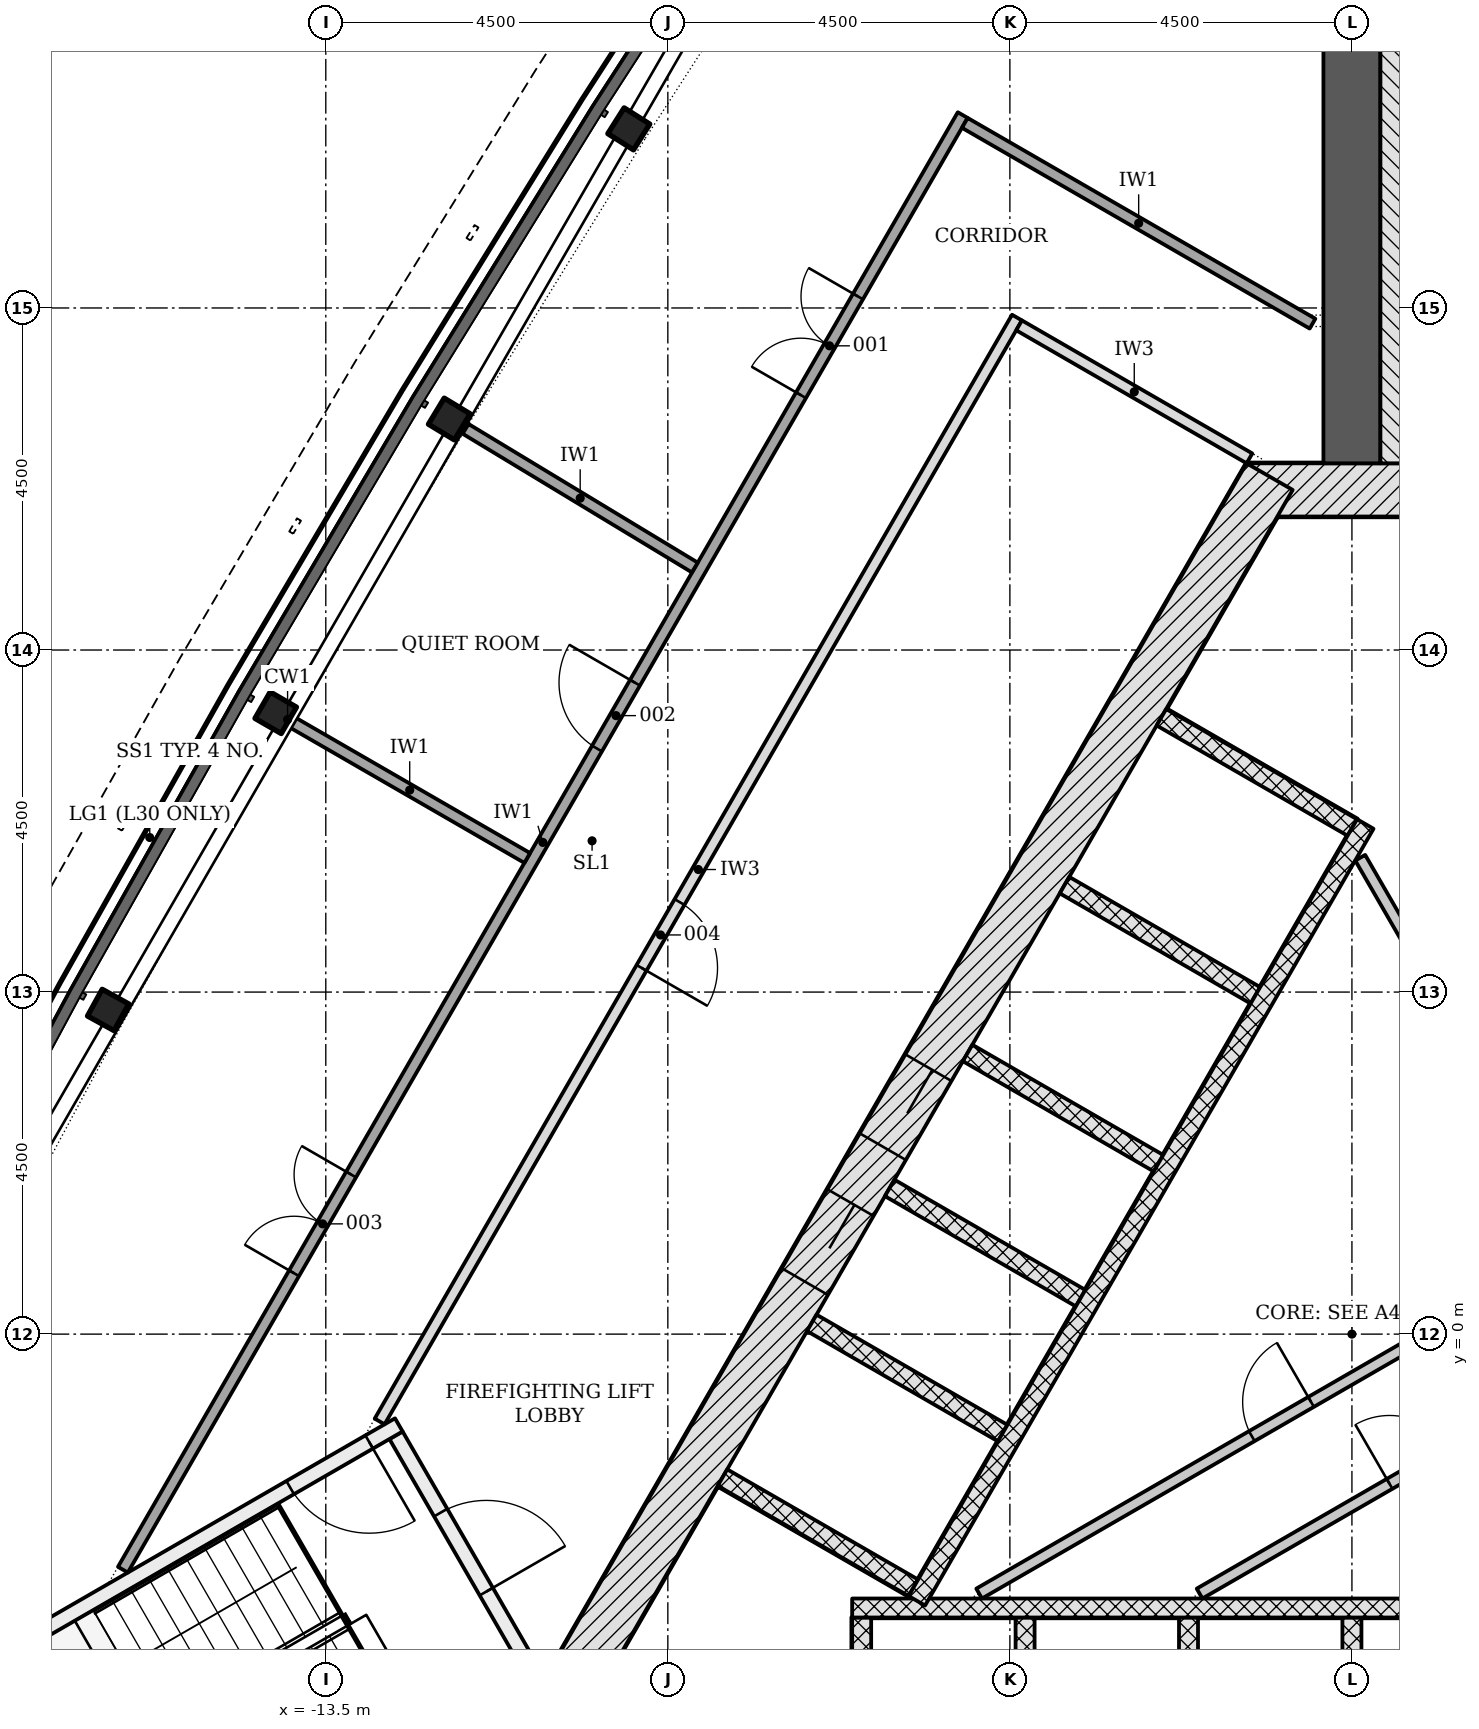
"""IFC4 building model, lengths in metres.
Left out: names, types, materials, properties, quantities, classifications, styles, units other than length and angle.
Written with IfcOpenShell. Run it as: python <this file> out.ifc"""

import sys

from ifc_helpers import new_model, si_unit, direction, frame, frame_2d, origin, origin_2d, place, context, subcontext, project, spatial, polyline, rectangle, i_section, outline, extrude, element, fill, save


model = new_model("IFC4")
c1 = context("Model", 3, precision=1e-05, world=origin(), true_north=direction((0.0, 1.0)))
c2 = subcontext(c1, "Body", "Model", "MODEL_VIEW")
j1 = project(units=[si_unit("LENGTHUNIT", "METRE"), si_unit("PLANEANGLEUNIT", "RADIAN")], contexts=[c1])
p1 = place(None, origin())
s1 = spatial("IfcSite", under=j1, at=p1, CompositionType="ELEMENT")
p2 = place(p1, origin())
s2 = spatial("IfcBuilding", under=s1, at=p2, CompositionType="ELEMENT")
p3 = place(p2, frame((0.0, 0.0, 116.7)))
s3 = spatial("IfcBuildingStorey", under=s2, at=p3, CompositionType="ELEMENT", Elevation=116.7)
p4 = place(p3, frame((1.386, 11.106, -0.2), z_axis=(0.0, 0.0, 1.0), x_axis=(-1.0, 0.0, 0.0)))
e1 = element("IfcWall", 1, at=p4, inside=s3, PredefinedType="SHEAR", context=c2, shape_type="SweptSolid", body=[
    extrude(rectangle(XDim=2.771, YDim=0.7, at=frame_2d((1.386, 0.0))), origin(), (0.0, 0.0, 1.0), 3.6),
])
p5 = place(p3, frame((-1.083, 11.281, -0.2), z_axis=(0.0, 0.0, 1.0), x_axis=(-0.500001446645, -0.866024568562, 0.0)))
e2 = element("IfcWall", 2, at=p5, inside=s3, PredefinedType="SHEAR", context=c2, shape_type="SweptSolid", body=[
    extrude(rectangle(XDim=18.458, YDim=0.7, at=frame_2d((9.229, 0.0))), origin(), (0.0, 0.0, 1.0), 3.6),
])
p6 = place(p5, frame((8.979, 0.0, 0.2)))
e3 = element("IfcOpeningElement", 3, at=p6, cuts=e2, PredefinedType="OPENING", context=c2, shape_type="SweptSolid", body=[
    extrude(rectangle(XDim=1.2, YDim=2.1, at=frame_2d((0.6, 1.05))), frame((0.0, 0.36, 0.0), z_axis=(0.0, -1.0, 0.0), x_axis=(1.0, 0.0, 0.0)), (0.0, 0.0, 1.0), 0.72),
])
p7 = place(p5, frame((11.029, 0.0, 0.2)))
e4 = element("IfcOpeningElement", 4, at=p7, cuts=e2, PredefinedType="OPENING", context=c2, shape_type="SweptSolid", body=[
    extrude(rectangle(XDim=1.2, YDim=2.1, at=frame_2d((0.6, 1.05))), frame((0.0, 0.36, 0.0), z_axis=(0.0, -1.0, 0.0), x_axis=(1.0, 0.0, 0.0)), (0.0, 0.0, 1.0), 0.72),
])
p8 = place(p3, frame((0.0, 11.456, -0.2), z_axis=(0.0, 0.0, 1.0), x_axis=(0.0, 1.0, 0.0)))
e5 = element("IfcWall", 5, at=p8, inside=s3, PredefinedType="SHEAR", context=c2, shape_type="SweptSolid", body=[
    extrude(rectangle(XDim=11.539, YDim=0.75, at=frame_2d((5.77, 0.0))), origin(), (0.0, 0.0, 1.0), 3.6),
])
for number, where, z_axis, x_axis in (
    (6, (-9.513, 15.856, -0.2), (0.0, 0.0, 1.0), (-0.535, -0.845, 0.0)),
    (7, (-11.875, 12.039, -0.2), (0.0, 0.0, 1.0), (-0.517, -0.856, 0.0)),
    (8, (-14.159, 8.175, -0.2), (0.0, 0.0, 1.0), (-0.5, -0.866, 0.0)),
    (9, (-16.364, 4.265, -0.2), (0.0, 0.0, 1.0), (-0.482, -0.876, 0.0)),
):
    element("IfcColumn", number, at=place(p3, frame(where, z_axis=z_axis, x_axis=x_axis)), inside=s3, PredefinedType="COLUMN", context=c2, shape_type="SweptSolid", body=[
        extrude(i_section(OverallWidth=0.401, OverallDepth=0.399, WebThickness=0.025, FlangeThickness=0.04, FilletRadius=0.015, at=origin_2d()), origin(), (0.0, 0.0, 1.0), 3.6),
    ])
for number, where, z_axis, x_axis in (
    (10, (-6.45, -6.228, -0.2), (0.0, 0.0, 1.0), (0.0, 1.0, 0.0)),
    (11, (-4.3, -6.228, -0.2), (0.0, 0.0, 1.0), (0.0, 1.0, 0.0)),
    (12, (-2.15, -6.228, -0.2), (0.0, 0.0, 1.0), (0.0, 1.0, 0.0)),
    (13, (0.0, -6.228, -0.2), (0.0, 0.0, 1.0), (0.0, 1.0, 0.0)),
):
    element("IfcWall", number, at=place(p3, frame(where, z_axis=z_axis, x_axis=x_axis)), inside=s3, PredefinedType="PARTITIONING", context=c2, shape_type="SweptSolid", body=[
        extrude(rectangle(XDim=2.5, YDim=0.25, at=frame_2d((1.25, 0.0))), origin(), (0.0, 0.0, 1.0), 3.6),
    ])
p9 = place(p3, frame((-6.575, -3.603, 0.0), z_axis=(0.0, 0.0, 1.0), x_axis=(1.0, 0.0, 0.0)))
e14 = element("IfcWall", 14, at=p9, inside=s3, PredefinedType="PARTITIONING", context=c2, shape_type="SweptSolid", body=[
    extrude(rectangle(XDim=13.15, YDim=0.25, at=frame_2d((6.575, 0.0))), origin(), (0.0, 0.0, 1.0), 3.4),
])
p10 = place(p3, frame((-2.506, 8.115, -0.2), z_axis=(0.0, 0.0, 1.0), x_axis=(0.865996321171, -0.50005036918, 0.0)))
e15 = element("IfcWall", 15, at=p10, inside=s3, PredefinedType="PARTITIONING", context=c2, shape_type="SweptSolid", body=[
    extrude(rectangle(XDim=2.9, YDim=0.25, at=frame_2d((1.45, 0.0))), origin(), (0.0, 0.0, 1.0), 3.6),
])
for number, where, z_axis, x_axis in (
    (16, (-3.781, 5.907, -0.2), (0.0, 0.0, 1.0), (0.866, -0.5, 0.0)),
    (17, (-5.056, 3.699, -0.2), (0.0, 0.0, 1.0), (0.866, -0.5, 0.0)),
    (18, (-6.081, 1.923, -0.2), (0.0, 0.0, 1.0), (0.866, -0.5, 0.0)),
    (19, (-7.106, 0.148, -0.2), (0.0, 0.0, 1.0), (0.866, -0.5, 0.0)),
    (20, (-8.281, -1.887, -0.2), (0.0, 0.0, 1.0), (0.866, -0.5, 0.0)),
):
    element("IfcWall", number, at=place(p3, frame(where, z_axis=z_axis, x_axis=x_axis)), inside=s3, PredefinedType="PARTITIONING", context=c2, shape_type="SweptSolid", body=[
        extrude(rectangle(XDim=2.9, YDim=0.25, at=frame_2d((1.45, 0.0))), origin(), (0.0, 0.0, 1.0), 3.6),
    ])
p11 = place(p3, frame((0.176, 6.711, 0.0), z_axis=(0.0, 0.0, 1.0), x_axis=(-0.500004227369, -0.866022963098, 0.0)))
e21 = element("IfcWall", 21, at=p11, inside=s3, PredefinedType="PARTITIONING", context=c2, shape_type="SweptSolid", body=[
    extrude(rectangle(XDim=11.8, YDim=0.25, at=frame_2d((5.9, 0.0))), origin(), (0.0, 0.0, 1.0), 3.4),
])
p12 = place(p3, frame((-4.904, -3.413, 0.0), z_axis=(0.0, 0.0, 1.0), x_axis=(0.866020716117, 0.500008119189, 0.0)))
e22 = element("IfcWall", 22, at=p12, inside=s3, PredefinedType="PARTITIONING", context=c2, shape_type="SweptSolid", body=[
    extrude(rectangle(XDim=12.182, YDim=0.15, at=frame_2d((6.091, 0.0))), origin(), (0.0, 0.0, 1.0), 3.4),
])
p13 = place(p12, frame((4.142, 0.0, 0.0)))
e23 = element("IfcOpeningElement", 23, at=p13, cuts=e22, PredefinedType="OPENING", context=c2, shape_type="SweptSolid", body=[
    extrude(rectangle(XDim=0.9, YDim=2.1, at=frame_2d((0.45, 1.05))), frame((0.0, 0.085, 0.0), z_axis=(0.0, -1.0, 0.0), x_axis=(1.0, 0.0, 0.0)), (0.0, 0.0, 1.0), 0.17),
])
p14 = place(p3, frame((-2.004, -3.413, 0.0), z_axis=(0.0, 0.0, 1.0), x_axis=(0.866030034802, 0.499991978756, 0.0)))
e24 = element("IfcWall", 24, at=p14, inside=s3, PredefinedType="PARTITIONING", context=c2, shape_type="SweptSolid", body=[
    extrude(rectangle(XDim=9.671, YDim=0.15, at=frame_2d((4.835, 0.0))), origin(), (0.0, 0.0, 1.0), 3.4),
])
p15 = place(p14, frame((2.886, 0.0, 0.0)))
e25 = element("IfcOpeningElement", 25, at=p15, cuts=e24, PredefinedType="OPENING", context=c2, shape_type="SweptSolid", body=[
    extrude(rectangle(XDim=0.9, YDim=2.1, at=frame_2d((0.45, 1.05))), frame((0.0, 0.085, 0.0), z_axis=(0.0, -1.0, 0.0), x_axis=(1.0, 0.0, 0.0)), (0.0, 0.0, 1.0), 0.17),
])
p16 = place(p3, frame((2.86, 1.503, 0.0), z_axis=(0.0, 0.0, 1.0), x_axis=(-0.500014382217, 0.866017100048, 0.0)))
e26 = element("IfcWall", 26, at=p16, inside=s3, PredefinedType="PARTITIONING", context=c2, shape_type="SweptSolid", body=[
    extrude(rectangle(XDim=5.502, YDim=0.15, at=frame_2d((2.751, 0.0))), origin(), (0.0, 0.0, 1.0), 3.4),
])
p17 = place(p3, frame((0.98, 11.456, -0.2), z_axis=(0.0, 0.0, 1.0), x_axis=(0.0, 1.0, 0.0)))
e27 = element("IfcWall", 27, at=p17, inside=s3, PredefinedType="SHEAR", context=c2, shape_type="SweptSolid", body=[
    extrude(rectangle(XDim=7.2, YDim=1.211, at=frame_2d((3.6, 0.0))), origin(), (0.0, 0.0, 1.0), 3.6),
])
p18 = place(p3, frame((-12.576, -1.331, -0.2), z_axis=(0.0, 0.0, 1.0), x_axis=(0.499970499736, -0.8660424351, 0.0)))
e28 = element("IfcWall", 28, at=p18, inside=s3, PredefinedType="SHEAR", context=c2, shape_type="SweptSolid", body=[
    extrude(rectangle(XDim=3.55, YDim=0.2, at=frame_2d((1.775, 0.0))), origin(), (0.0, 0.0, 1.0), 3.6),
])
p19 = place(p18, frame((1.175, 0.0, 0.2)))
e29 = element("IfcOpeningElement", 29, at=p19, cuts=e28, PredefinedType="OPENING", context=c2, shape_type="SweptSolid", body=[
    extrude(rectangle(XDim=1.2, YDim=2.1, at=frame_2d((0.6, 1.05))), frame((0.0, 0.11, 0.0), z_axis=(0.0, -1.0, 0.0), x_axis=(1.0, 0.0, 0.0)), (0.0, 0.0, 1.0), 0.22),
])
p20 = place(p3, frame((-12.539, -1.194, -0.2), z_axis=(0.0, 0.0, 1.0), x_axis=(-0.866045472092, -0.499965239061, 0.0)))
e30 = element("IfcWall", 30, at=p20, inside=s3, PredefinedType="SHEAR", context=c2, shape_type="SweptSolid", body=[
    extrude(rectangle(XDim=5.6, YDim=0.2, at=frame_2d((2.8, 0.0))), origin(), (0.0, 0.0, 1.0), 3.6),
])
p21 = place(p20, frame((0.45, 0.0, 0.2)))
e31 = element("IfcOpeningElement", 31, at=p21, cuts=e30, PredefinedType="OPENING", context=c2, shape_type="SweptSolid", body=[
    extrude(rectangle(XDim=1.2, YDim=2.1, at=frame_2d((0.6, 1.05))), frame((0.0, 0.11, 0.0), z_axis=(0.0, -1.0, 0.0), x_axis=(1.0, 0.0, 0.0)), (0.0, 0.0, 1.0), 0.22),
])
p22 = place(p3, frame((0.0, 0.0, -0.2)))
e32 = element("IfcWall", 32, at=p22, inside=s3, PredefinedType="SHEAR", context=c2, shape_type="SweptSolid", body=[
    extrude(outline(polyline([(-17.439, -3.907), (-18.025, -6.093), (-16.95, -7.955), (-16.777, -7.855), (-17.81, -6.065), (-17.267, -4.039), (-17.339, -4.081), (-17.339, -4.081), (-17.339, -4.081), (-17.339, -4.081), (-17.339, -4.081), (-17.339, -4.081), (-17.339, -4.081), (-17.339, -4.081), (-17.339, -4.081), (-17.339, -4.081), (-17.339, -4.081), (-17.339, -4.081), (-17.339, -4.081), (-17.339, -4.081), (-17.339, -4.081), (-17.339, -4.081), (-17.339, -4.081), (-17.439, -3.907)])), origin(), (0.0, 0.0, 1.0), 3.6),
])
p23 = place(p3, frame((-16.169, -3.099, 0.0), z_axis=(0.0, 0.0, 1.0), x_axis=(0.499999805269, 0.866025516212, 0.0)))
e33 = element("IfcWall", 33, at=p23, inside=s3, PredefinedType="PARTITIONING", context=c2, shape_type="SweptSolid", body=[
    extrude(rectangle(XDim=22.097, YDim=0.15, at=frame_2d((11.049, 0.0))), origin(), (0.0, 0.0, 1.0), 2.847),
])
p24 = place(p23, frame((17.842, 0.0, 0.0)))
e34 = element("IfcOpeningElement", 34, at=p24, cuts=e33, PredefinedType="OPENING", context=c2, shape_type="SweptSolid", body=[
    extrude(rectangle(XDim=1.5, YDim=2.1, at=frame_2d((0.75, 1.05))), frame((0.0, 0.085, 0.0), z_axis=(0.0, -1.0, 0.0), x_axis=(1.0, 0.0, 0.0)), (0.0, 0.0, 1.0), 0.17),
])
p25 = place(p23, frame((12.474, 0.0, 0.0)))
e35 = element("IfcOpeningElement", 35, at=p25, cuts=e33, PredefinedType="OPENING", context=c2, shape_type="SweptSolid", body=[
    extrude(rectangle(XDim=1.0, YDim=2.1, at=frame_2d((0.5, 1.05))), frame((0.0, 0.085, 0.0), z_axis=(0.0, -1.0, 0.0), x_axis=(1.0, 0.0, 0.0)), (0.0, 0.0, 1.0), 0.17),
])
p26 = place(p23, frame((4.503, 0.0, 0.0)))
e36 = element("IfcOpeningElement", 36, at=p26, cuts=e33, PredefinedType="OPENING", context=c2, shape_type="SweptSolid", body=[
    extrude(rectangle(XDim=1.5, YDim=2.1, at=frame_2d((0.75, 1.05))), frame((0.0, 0.085, 0.0), z_axis=(0.0, -1.0, 0.0), x_axis=(1.0, 0.0, 0.0)), (0.0, 0.0, 1.0), 0.17),
])
p27 = place(p3, frame((-4.407, 13.374, 0.0), z_axis=(0.0, 0.0, 1.0), x_axis=(-0.499997181693, -0.866027030928, 0.0)))
e37 = element("IfcWall", 37, at=p27, inside=s3, PredefinedType="PARTITIONING", context=c2, shape_type="SweptSolid", body=[
    extrude(rectangle(XDim=16.77, YDim=0.15, at=frame_2d((8.385, 0.0))), origin(), (0.0, 0.0, 1.0), 2.847),
])
p28 = place(p27, frame((8.879, 0.0, 0.0)))
e38 = element("IfcOpeningElement", 38, at=p28, cuts=e37, PredefinedType="OPENING", context=c2, shape_type="SweptSolid", body=[
    extrude(rectangle(XDim=1.0, YDim=2.1, at=frame_2d((0.5, 1.05))), frame((0.0, 0.085, 0.0), z_axis=(0.0, -1.0, 0.0), x_axis=(1.0, 0.0, 0.0)), (0.0, 0.0, 1.0), 0.17),
])
p29 = place(p3, frame((-5.093, 15.935, 0.0), z_axis=(0.0, 0.0, 1.0), x_axis=(0.866033195618, -0.499986503906, 0.0)))
e39 = element("IfcWall", 39, at=p29, inside=s3, PredefinedType="PARTITIONING", context=c2, shape_type="SweptSolid", body=[
    extrude(rectangle(XDim=5.282, YDim=0.15, at=frame_2d((2.641, 0.0))), origin(), (0.0, 0.0, 1.0), 3.4),
])
p30 = place(p3, frame((-4.379, 13.271, 0.0), z_axis=(0.0, 0.0, 1.0), x_axis=(0.866019471182, -0.500010275428, 0.0)))
e40 = element("IfcWall", 40, at=p30, inside=s3, PredefinedType="PARTITIONING", context=c2, shape_type="SweptSolid", body=[
    extrude(rectangle(XDim=3.5, YDim=0.15, at=frame_2d((1.75, 0.0))), origin(), (0.0, 0.0, 1.0), 3.4),
])
p31 = place(p3, frame((-13.942, 8.05, 0.0), z_axis=(0.0, 0.0, 1.0), x_axis=(0.866034162518, -0.499984829122, 0.0)))
e41 = element("IfcWall", 41, at=p31, inside=s3, PredefinedType="PARTITIONING", context=c2, shape_type="SweptSolid", body=[
    extrude(rectangle(XDim=3.571, YDim=0.15, at=frame_2d((1.785, 0.0))), origin(), (0.0, 0.0, 1.0), 2.847),
])
p32 = place(p3, frame((-11.661, 11.91, 0.0), z_axis=(0.0, 0.0, 1.0), x_axis=(0.855697033778, -0.517477136098, 0.0)))
e42 = element("IfcWall", 42, at=p32, inside=s3, PredefinedType="PARTITIONING", context=c2, shape_type="SweptSolid", body=[
    extrude(rectangle(XDim=3.525, YDim=0.15, at=frame_2d((1.762, 0.0))), origin(), (0.0, 0.0, 1.0), 2.847),
])
p33 = place(p6, origin())
e43 = element("IfcDoor", 43, at=p33, inside=s3, OperationType="DOUBLE_DOOR_SLIDING", PredefinedType="DOOR", context=c2, shape_type="SweptSolid", body=[
    extrude(rectangle(XDim=1.2, YDim=2.1, at=frame_2d((0.6, 1.05))), frame((0.0, 0.025, 0.0), z_axis=(0.0, -1.0, 0.0), x_axis=(1.0, 0.0, 0.0)), (0.0, 0.0, 1.0), 0.05),
])
fill(e3, e43)
p34 = place(p7, origin())
e44 = element("IfcDoor", 44, at=p34, inside=s3, OperationType="DOUBLE_DOOR_SLIDING", PredefinedType="DOOR", context=c2, shape_type="SweptSolid", body=[
    extrude(rectangle(XDim=1.2, YDim=2.1, at=frame_2d((0.6, 1.05))), frame((0.0, 0.025, 0.0), z_axis=(0.0, -1.0, 0.0), x_axis=(1.0, 0.0, 0.0)), (0.0, 0.0, 1.0), 0.05),
])
fill(e4, e44)
p35 = place(p15, origin())
e45 = element("IfcDoor", 45, at=p35, inside=s3, OperationType="SINGLE_SWING_LEFT", PredefinedType="DOOR", context=c2, shape_type="SweptSolid", body=[
    extrude(rectangle(XDim=0.9, YDim=2.1, at=frame_2d((0.45, 1.05))), frame((0.0, 0.025, 0.0), z_axis=(0.0, -1.0, 0.0), x_axis=(1.0, 0.0, 0.0)), (0.0, 0.0, 1.0), 0.05),
])
fill(e25, e45)
p36 = place(p13, origin())
e46 = element("IfcDoor", 46, at=p36, inside=s3, OperationType="SINGLE_SWING_RIGHT", PredefinedType="DOOR", context=c2, shape_type="SweptSolid", body=[
    extrude(rectangle(XDim=0.9, YDim=2.1, at=frame_2d((0.45, 1.05))), frame((0.0, 0.025, 0.0), z_axis=(0.0, -1.0, 0.0), x_axis=(1.0, 0.0, 0.0)), (0.0, 0.0, 1.0), 0.05),
])
fill(e23, e46)
p37 = place(p19, origin())
e47 = element("IfcDoor", 47, at=p37, inside=s3, OperationType="SINGLE_SWING_RIGHT", PredefinedType="DOOR", context=c2, shape_type="SweptSolid", body=[
    extrude(rectangle(XDim=1.2, YDim=2.1, at=frame_2d((0.6, 1.05))), frame((0.0, 0.025, 0.0), z_axis=(0.0, -1.0, 0.0), x_axis=(1.0, 0.0, 0.0)), (0.0, 0.0, 1.0), 0.05),
])
fill(e29, e47)
p38 = place(p21, origin())
e48 = element("IfcDoor", 48, at=p38, inside=s3, OperationType="SINGLE_SWING_LEFT", PredefinedType="DOOR", context=c2, shape_type="SweptSolid", body=[
    extrude(rectangle(XDim=1.2, YDim=2.1, at=frame_2d((0.6, 1.05))), frame((0.0, 0.025, 0.0), z_axis=(0.0, -1.0, 0.0), x_axis=(1.0, 0.0, 0.0)), (0.0, 0.0, 1.0), 0.05),
])
fill(e31, e48)
p39 = place(p24, origin())
e49 = element("IfcDoor", 49, at=p39, inside=s3, OperationType="DOUBLE_DOOR_SINGLE_SWING", PredefinedType="DOOR", context=c2, shape_type="SweptSolid", body=[
    extrude(rectangle(XDim=1.5, YDim=2.1, at=frame_2d((0.75, 1.05))), frame((0.0, 0.025, 0.0), z_axis=(0.0, -1.0, 0.0), x_axis=(1.0, 0.0, 0.0)), (0.0, 0.0, 1.0), 0.05),
])
fill(e34, e49)
p40 = place(p25, origin())
e50 = element("IfcDoor", 50, at=p40, inside=s3, OperationType="SINGLE_SWING_RIGHT", PredefinedType="DOOR", context=c2, shape_type="SweptSolid", body=[
    extrude(rectangle(XDim=1.0, YDim=2.1, at=frame_2d((0.5, 1.05))), frame((0.0, 0.025, 0.0), z_axis=(0.0, -1.0, 0.0), x_axis=(1.0, 0.0, 0.0)), (0.0, 0.0, 1.0), 0.05),
])
fill(e35, e50)
p41 = place(p26, origin())
e51 = element("IfcDoor", 51, at=p41, inside=s3, OperationType="DOUBLE_DOOR_SINGLE_SWING", PredefinedType="DOOR", context=c2, shape_type="SweptSolid", body=[
    extrude(rectangle(XDim=1.5, YDim=2.1, at=frame_2d((0.75, 1.05))), frame((0.0, 0.025, 0.0), z_axis=(0.0, -1.0, 0.0), x_axis=(1.0, 0.0, 0.0)), (0.0, 0.0, 1.0), 0.05),
])
fill(e36, e51)
p42 = place(p28, origin())
e52 = element("IfcDoor", 52, at=p42, inside=s3, OperationType="SINGLE_SWING_RIGHT", PredefinedType="DOOR", context=c2, shape_type="SweptSolid", body=[
    extrude(rectangle(XDim=1.0, YDim=2.1, at=frame_2d((0.5, 1.05))), frame((0.0, 0.025, 0.0), z_axis=(0.0, -1.0, 0.0), x_axis=(1.0, 0.0, 0.0)), (0.0, 0.0, 1.0), 0.05),
])
fill(e38, e52)
save(model, sys.argv[1])
